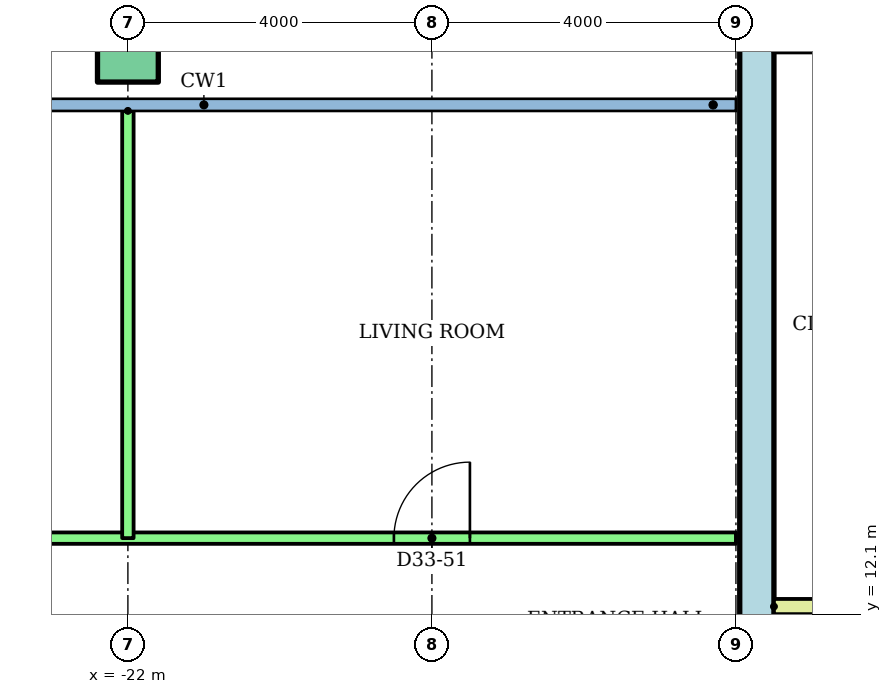
"""IFC4 building model, lengths in metres.
Left out: names, types, materials, properties, quantities, classifications, styles, units other than length and angle.
Written with IfcOpenShell. Run it as: python <this file> out.ifc"""

import sys

from ifc_helpers import new_model, si_unit, direction, frame, frame_2d, origin, origin_2d, place, context, subcontext, project, spatial, rectangle, hollow_rectangle, extrude, element, fill, save


model = new_model("IFC4")
c1 = context("Model", 3, precision=1e-05, world=origin(), true_north=direction((0.0, 1.0)))
c2 = subcontext(c1, "Body", "Model", "MODEL_VIEW")
j1 = project(units=[si_unit("LENGTHUNIT", "METRE"), si_unit("PLANEANGLEUNIT", "RADIAN")], contexts=[c1])
p1 = place(None, origin())
s1 = spatial("IfcSite", under=j1, at=p1, CompositionType="ELEMENT")
p2 = place(p1, origin())
s2 = spatial("IfcBuilding", under=s1, at=p2, CompositionType="ELEMENT")
p3 = place(p2, frame((0.0, 0.0, 129.4)))
s3 = spatial("IfcBuildingStorey", under=s2, at=p3, CompositionType="ELEMENT", Elevation=129.4)
p4 = place(p3, frame((-22.0, 19.5, 0.0)))
e1 = element("IfcColumn", 1, at=p4, inside=s3, PredefinedType="COLUMN", context=c2, shape_type="SweptSolid", body=[
    extrude(hollow_rectangle(XDim=0.8, YDim=0.8, WallThickness=0.04, at=origin_2d()), origin(), (0.0, 0.0, 1.0), 3.2),
])
p5 = place(p3, frame((-13.725, 3.0, 0.0), z_axis=(0.0, 0.0, 1.0), x_axis=(0.0, 1.0, 0.0)))
e2 = element("IfcWall", 2, at=p5, inside=s3, PredefinedType="SHEAR", context=c2, shape_type="SweptSolid", body=[
    extrude(rectangle(XDim=17.0, YDim=0.45, at=frame_2d((8.5, 0.0))), origin(), (0.0, 0.0, 1.0), 2.92),
])
p6 = place(p3, frame((-13.5, 12.2, 0.0)))
e3 = element("IfcWall", 3, at=p6, inside=s3, PredefinedType="PARTITIONING", context=c2, shape_type="SweptSolid", body=[
    extrude(rectangle(XDim=3.9, YDim=0.2, at=frame_2d((1.95, 0.0))), origin(), (0.0, 0.0, 1.0), 2.92),
])
p7 = place(p3, frame((-32.72, 13.1, 0.0)))
e4 = element("IfcWall", 4, at=p7, inside=s3, PredefinedType="PARTITIONING", context=c2, shape_type="SweptSolid", body=[
    extrude(rectangle(XDim=18.72, YDim=0.15, at=frame_2d((9.36, 0.0))), origin(), (0.0, 0.0, 1.0), 2.4),
])
p8 = place(p7, frame((2.02, 0.0, 0.0)))
e5 = element("IfcOpeningElement", 5, at=p8, cuts=e4, PredefinedType="OPENING", context=c2, shape_type="SweptSolid", body=[
    extrude(rectangle(XDim=0.9, YDim=2.1, at=frame_2d((0.45, 1.05))), frame((0.0, 0.085, 0.0), z_axis=(0.0, -1.0, 0.0), x_axis=(1.0, 0.0, 0.0)), (0.0, 0.0, 1.0), 0.17),
])
p9 = place(p7, frame((7.47, 0.0, 0.0)))
e6 = element("IfcOpeningElement", 6, at=p9, cuts=e4, PredefinedType="OPENING", context=c2, shape_type="SweptSolid", body=[
    extrude(rectangle(XDim=0.9, YDim=2.1, at=frame_2d((0.45, 1.05))), frame((0.0, 0.085, 0.0), z_axis=(0.0, -1.0, 0.0), x_axis=(1.0, 0.0, 0.0)), (0.0, 0.0, 1.0), 0.17),
])
p10 = place(p7, frame((14.22, 0.0, 0.0)))
e7 = element("IfcOpeningElement", 7, at=p10, cuts=e4, PredefinedType="OPENING", context=c2, shape_type="SweptSolid", body=[
    extrude(rectangle(XDim=1.0, YDim=2.1, at=frame_2d((0.5, 1.05))), frame((0.0, 0.085, 0.0), z_axis=(0.0, -1.0, 0.0), x_axis=(1.0, 0.0, 0.0)), (0.0, 0.0, 1.0), 0.17),
])
p11 = place(p3, frame((-22.0, 18.721, 0.0), z_axis=(0.0, 0.0, 1.0), x_axis=(0.0, -1.0, 0.0)))
e8 = element("IfcWall", 8, at=p11, inside=s3, PredefinedType="PARTITIONING", context=c2, shape_type="SweptSolid", body=[
    extrude(rectangle(XDim=5.621, YDim=0.15, at=frame_2d((2.811, 0.0))), origin(), (0.0, 0.0, 1.0), 2.4),
])
p12 = place(p10, origin())
e9 = element("IfcDoor", 9, at=p12, inside=s3, OperationType="SINGLE_SWING_RIGHT", PredefinedType="DOOR", context=c2, shape_type="SweptSolid", body=[
    extrude(rectangle(XDim=1.0, YDim=2.1, at=frame_2d((0.5, 1.05))), frame((0.0, 0.025, 0.0), z_axis=(0.0, -1.0, 0.0), x_axis=(1.0, 0.0, 0.0)), (0.0, 0.0, 1.0), 0.05),
])
fill(e7, e9)
save(model, sys.argv[1])
